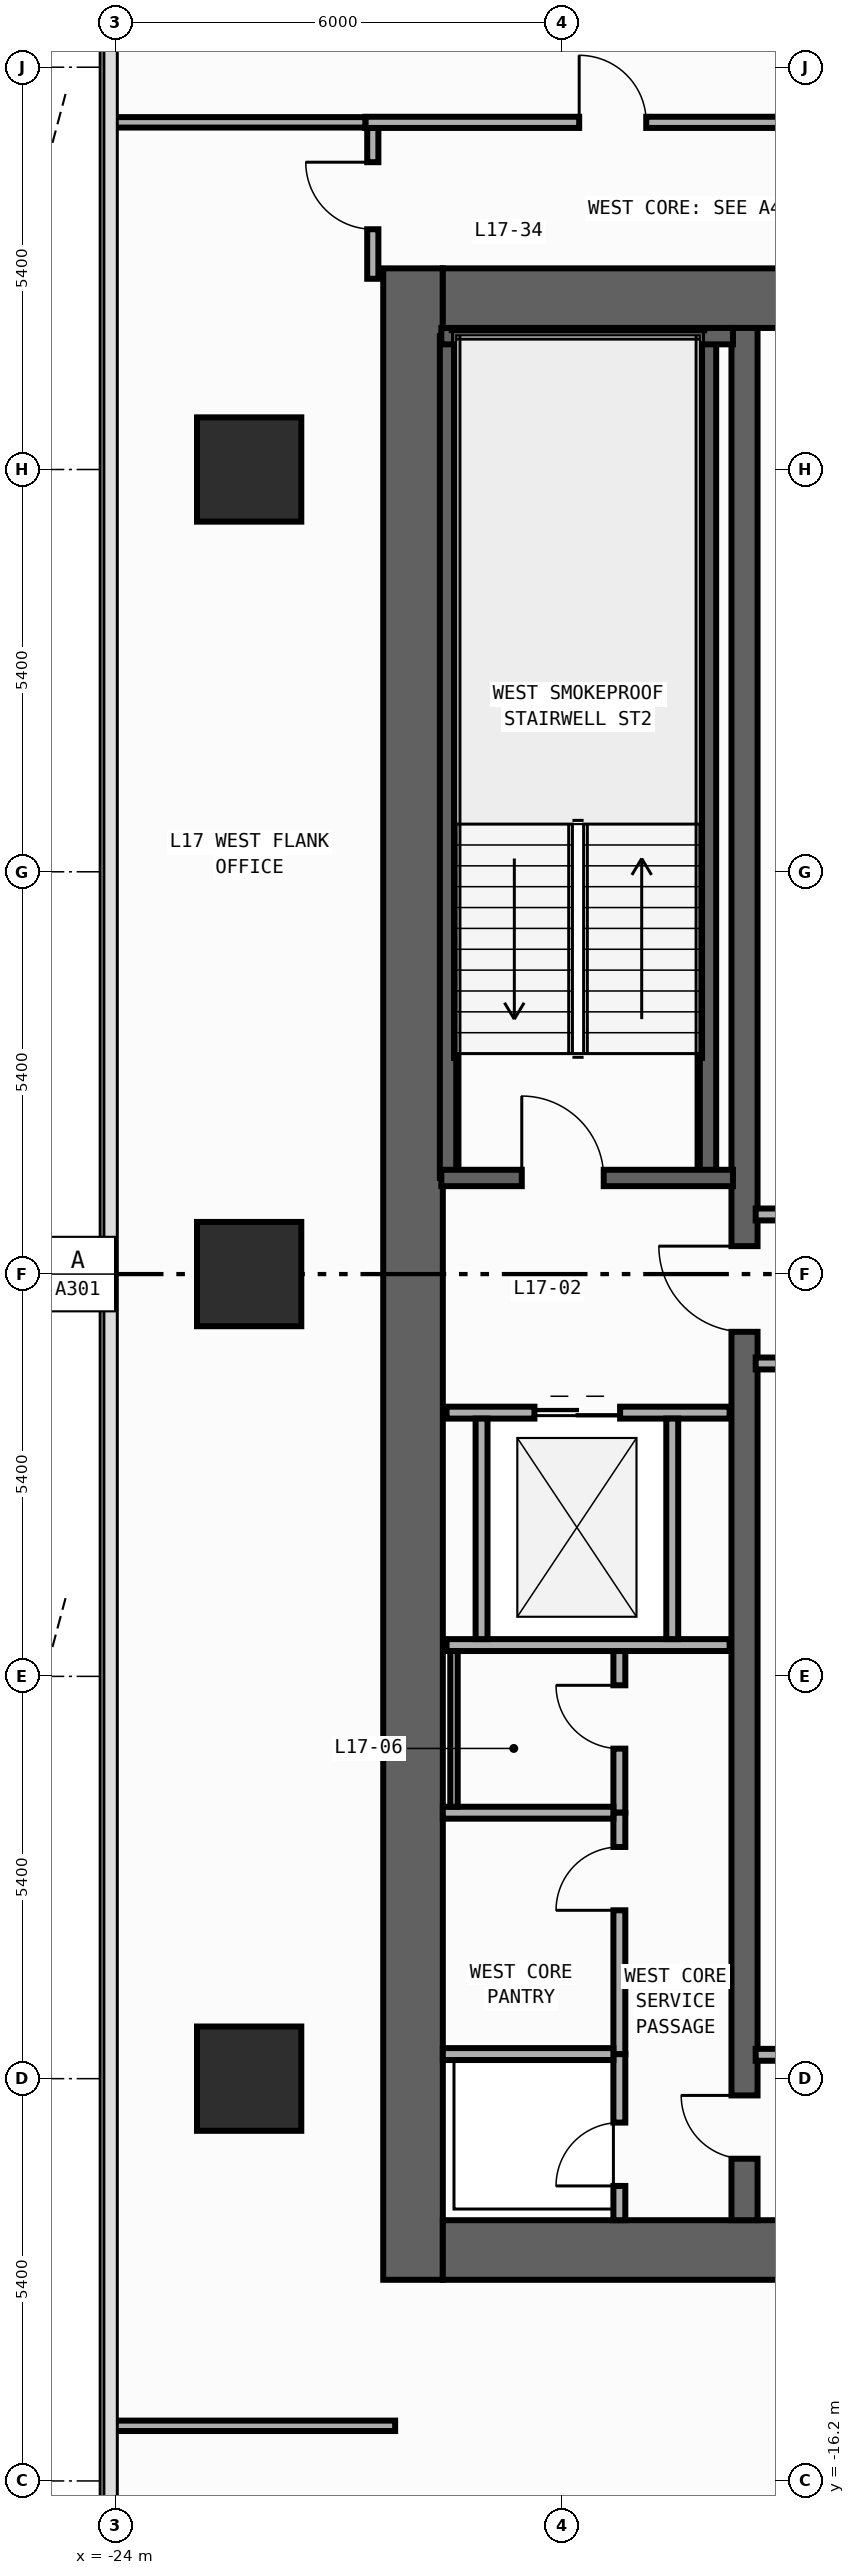
"""IFC4 building model, lengths in metres.
Left out: names, types, materials, properties, quantities, classifications, styles, units other than length and angle.
Written with IfcOpenShell. Run it as: python <this file> out.ifc"""

import sys

from ifc_helpers import new_model, si_unit, direction, frame, frame_2d, origin, origin_2d, place, context, subcontext, project, spatial, rectangle, extrude, element, fill, save


model = new_model("IFC4")
c1 = context("Model", 3, precision=1e-05, world=origin(), true_north=direction((0.0, 1.0)))
c2 = subcontext(c1, "Body", "Model", "MODEL_VIEW")
j1 = project(units=[si_unit("LENGTHUNIT", "METRE"), si_unit("PLANEANGLEUNIT", "RADIAN")], contexts=[c1])
p1 = place(None, origin())
s1 = spatial("IfcSite", under=j1, at=p1, CompositionType="ELEMENT")
p2 = place(p1, origin())
s2 = spatial("IfcBuilding", under=s1, at=p2, CompositionType="ELEMENT")
p3 = place(p2, frame((0.0, 0.0, 72.2)))
s3 = spatial("IfcBuildingStorey", under=s2, at=p3, CompositionType="ELEMENT", Elevation=72.2)
p4 = place(p3, frame((-20.0, -13.5, 0.0), z_axis=(0.0, 0.0, 1.0), x_axis=(0.0, 1.0, 0.0)))
e1 = element("IfcWall", 1, at=p4, inside=s3, PredefinedType="SHEAR", context=c2, shape_type="SweptSolid", body=[
    extrude(rectangle(XDim=27.0, YDim=0.8, at=frame_2d((13.5, 0.0))), origin(), (0.0, 0.0, 1.0), 3.94),
])
for number, where, z_axis, x_axis in (
    (2, (-19.6, -13.1, 0.0), (0.0, 0.0, 1.0), (1.0, 0.0, 0.0)),
    (3, (-19.6, 13.1, 0.0), (0.0, 0.0, 1.0), (1.0, 0.0, 0.0)),
):
    element("IfcWall", number, at=place(p3, frame(where, z_axis=z_axis, x_axis=x_axis)), inside=s3, PredefinedType="SHEAR", context=c2, shape_type="SweptSolid", body=[
        extrude(rectangle(XDim=6.8, YDim=0.8, at=frame_2d((3.4, 0.0))), origin(), (0.0, 0.0, 1.0), 3.94),
    ])
p5 = place(p3, frame((-15.55, -12.7, 0.0), z_axis=(0.0, 0.0, 1.0), x_axis=(0.0, 1.0, 0.0)))
e4 = element("IfcWall", 4, at=p5, inside=s3, PredefinedType="SHEAR", context=c2, shape_type="SweptSolid", body=[
    extrude(rectangle(XDim=25.4, YDim=0.35, at=frame_2d((12.7, 0.0))), origin(), (0.0, 0.0, 1.0), 3.94),
])
p6 = place(p5, frame((11.925, 0.0, 0.0)))
e5 = element("IfcOpeningElement", 5, at=p6, cuts=e4, PredefinedType="OPENING", context=c2, shape_type="SweptSolid", body=[
    extrude(rectangle(XDim=1.15, YDim=2.2, at=frame_2d((0.575, 1.1))), frame((0.0, 0.185, 0.0), z_axis=(0.0, -1.0, 0.0), x_axis=(1.0, 0.0, 0.0)), (0.0, 0.0, 1.0), 0.37),
])
p7 = place(p5, frame((0.825, 0.0, 0.0)))
e6 = element("IfcOpeningElement", 6, at=p7, cuts=e4, PredefinedType="OPENING", context=c2, shape_type="SweptSolid", body=[
    extrude(rectangle(XDim=0.85, YDim=2.1, at=frame_2d((0.425, 1.05))), frame((0.0, 0.185, 0.0), z_axis=(0.0, -1.0, 0.0), x_axis=(1.0, 0.0, 0.0)), (0.0, 0.0, 1.0), 0.37),
])
for number, where, z_axis, x_axis in (
    (7, (-16.04, 1.29, 0.0), (0.0, 0.0, 1.0), (0.0, 1.0, 0.0)),
    (8, (-19.53, 1.29, 0.0), (0.0, 0.0, 1.0), (0.0, 1.0, 0.0)),
):
    element("IfcWall", number, at=place(p3, frame(where, z_axis=z_axis, x_axis=x_axis)), inside=s3, PredefinedType="SHEAR", context=c2, shape_type="SweptSolid", body=[
        extrude(rectangle(XDim=11.3, YDim=0.22, at=frame_2d((5.65, 0.0))), origin(), (0.0, 0.0, 1.0), 3.94),
    ])
p8 = place(p3, frame((-19.62, 12.59, 0.0), z_axis=(0.0, 0.0, 1.0), x_axis=(1.0, 0.0, 0.0)))
e9 = element("IfcWall", 9, at=p8, inside=s3, PredefinedType="SHEAR", context=c2, shape_type="SweptSolid", body=[
    extrude(rectangle(XDim=3.915, YDim=0.22, at=frame_2d((1.958, 0.0))), origin(), (0.0, 0.0, 1.0), 3.94),
])
p9 = place(p3, frame((-19.62, 1.29, 0.0), z_axis=(0.0, 0.0, 1.0), x_axis=(1.0, 0.0, 0.0)))
e10 = element("IfcWall", 10, at=p9, inside=s3, PredefinedType="SHEAR", context=c2, shape_type="SweptSolid", body=[
    extrude(rectangle(XDim=3.915, YDim=0.22, at=frame_2d((1.958, 0.0))), origin(), (0.0, 0.0, 1.0), 3.94),
])
p10 = place(p9, frame((1.08, 0.0, 0.0)))
e11 = element("IfcOpeningElement", 11, at=p10, cuts=e10, PredefinedType="OPENING", context=c2, shape_type="SweptSolid", body=[
    extrude(rectangle(XDim=1.1, YDim=2.2, at=frame_2d((0.55, 1.1))), frame((0.0, 0.12, 0.0), z_axis=(0.0, -1.0, 0.0), x_axis=(1.0, 0.0, 0.0)), (0.0, 0.0, 1.0), 0.24),
])
for number, where, z_axis, x_axis in (
    (12, (-22.2, -10.8, 0.0), (0.0, 0.0, 1.0), (1.0, 0.0, 0.0)),
    (13, (-22.2, 0.0, 0.0), (0.0, 0.0, 1.0), (1.0, 0.0, 0.0)),
    (14, (-22.2, 10.8, 0.0), (0.0, 0.0, 1.0), (1.0, 0.0, 0.0)),
):
    element("IfcColumn", number, at=place(p3, frame(where, z_axis=z_axis, x_axis=x_axis)), inside=s3, PredefinedType="COLUMN", context=c2, shape_type="SweptSolid", body=[
        extrude(rectangle(XDim=1.4, YDim=1.4, at=origin_2d()), origin(), (0.0, 0.0, 1.0), 4.2),
    ])
p11 = place(p3, frame((-19.55, -1.86, 0.0), z_axis=(0.0, 0.0, 1.0), x_axis=(1.0, 0.0, 0.0)))
e15 = element("IfcWall", 15, at=p11, inside=s3, PredefinedType="STANDARD", context=c2, shape_type="SweptSolid", body=[
    extrude(rectangle(XDim=3.8, YDim=0.16, at=frame_2d((1.9, 0.0))), origin(), (0.0, 0.0, 1.0), 3.94),
])
p12 = place(p11, frame((1.18, 0.0, 0.0)))
e16 = element("IfcOpeningElement", 16, at=p12, cuts=e15, PredefinedType="OPENING", context=c2, shape_type="SweptSolid", body=[
    extrude(rectangle(XDim=1.15, YDim=2.2, at=frame_2d((0.575, 1.1))), frame((0.0, 0.09, 0.0), z_axis=(0.0, -1.0, 0.0), x_axis=(1.0, 0.0, 0.0)), (0.0, 0.0, 1.0), 0.18),
])
p13 = place(p3, frame((-19.55, -4.98, 0.0), z_axis=(0.0, 0.0, 1.0), x_axis=(1.0, 0.0, 0.0)))
e17 = element("IfcWall", 17, at=p13, inside=s3, PredefinedType="STANDARD", context=c2, shape_type="SweptSolid", body=[
    extrude(rectangle(XDim=3.8, YDim=0.16, at=frame_2d((1.9, 0.0))), origin(), (0.0, 0.0, 1.0), 3.94),
])
for number, where, z_axis, x_axis in (
    (18, (-19.08, -4.9, 0.0), (0.0, 0.0, 1.0), (0.0, 1.0, 0.0)),
    (19, (-16.52, -4.9, 0.0), (0.0, 0.0, 1.0), (0.0, 1.0, 0.0)),
):
    element("IfcWall", number, at=place(p3, frame(where, z_axis=z_axis, x_axis=x_axis)), inside=s3, PredefinedType="STANDARD", context=c2, shape_type="SweptSolid", body=[
        extrude(rectangle(XDim=2.96, YDim=0.16, at=frame_2d((1.48, 0.0))), origin(), (0.0, 0.0, 1.0), 3.94),
    ])
for number, where, z_axis, x_axis in (
    (20, (-15.4, 0.8, 0.0), (0.0, 0.0, 1.0), (1.0, 0.0, 0.0)),
    (21, (-15.4, -1.2, 0.0), (0.0, 0.0, 1.0), (1.0, 0.0, 0.0)),
    (22, (-15.4, -10.48, 0.0), (0.0, 0.0, 1.0), (1.0, 0.0, 0.0)),
):
    element("IfcWall", number, at=place(p3, frame(where, z_axis=z_axis, x_axis=x_axis)), inside=s3, PredefinedType="STANDARD", context=c2, shape_type="SweptSolid", body=[
        extrude(rectangle(XDim=2.6, YDim=0.16, at=frame_2d((1.3, 0.0))), origin(), (0.0, 0.0, 1.0), 3.94),
    ])
p14 = place(p3, frame((-17.23, -12.7, 0.0), z_axis=(0.0, 0.0, 1.0), x_axis=(0.0, 1.0, 0.0)))
e23 = element("IfcWall", 23, at=p14, inside=s3, PredefinedType="PARTITIONING", context=c2, shape_type="SweptSolid", body=[
    extrude(rectangle(XDim=2.23, YDim=0.16, at=frame_2d((1.115, 0.0))), origin(), (0.0, 0.0, 1.0), 3.94),
])
p15 = place(p14, frame((0.46, 0.0, 0.0)))
e24 = element("IfcOpeningElement", 24, at=p15, cuts=e23, PredefinedType="OPENING", context=c2, shape_type="SweptSolid", body=[
    extrude(rectangle(XDim=0.85, YDim=2.1, at=frame_2d((0.425, 1.05))), frame((0.0, 0.09, 0.0), z_axis=(0.0, -1.0, 0.0), x_axis=(1.0, 0.0, 0.0)), (0.0, 0.0, 1.0), 0.18),
])
p16 = place(p3, frame((-17.23, -7.23, 0.0), z_axis=(0.0, 0.0, 1.0), x_axis=(0.0, 1.0, 0.0)))
e25 = element("IfcWall", 25, at=p16, inside=s3, PredefinedType="PARTITIONING", context=c2, shape_type="SweptSolid", body=[
    extrude(rectangle(XDim=2.17, YDim=0.16, at=frame_2d((1.085, 0.0))), origin(), (0.0, 0.0, 1.0), 3.94),
])
p17 = place(p16, frame((0.86, 0.0, 0.0)))
e26 = element("IfcOpeningElement", 26, at=p17, cuts=e25, PredefinedType="OPENING", context=c2, shape_type="SweptSolid", body=[
    extrude(rectangle(XDim=0.85, YDim=2.1, at=frame_2d((0.425, 1.05))), frame((0.0, 0.09, 0.0), z_axis=(0.0, -1.0, 0.0), x_axis=(1.0, 0.0, 0.0)), (0.0, 0.0, 1.0), 0.18),
])
p18 = place(p3, frame((-17.23, -10.47, 0.0), z_axis=(0.0, 0.0, 1.0), x_axis=(0.0, 1.0, 0.0)))
e27 = element("IfcWall", 27, at=p18, inside=s3, PredefinedType="PARTITIONING", context=c2, shape_type="SweptSolid", body=[
    extrude(rectangle(XDim=3.24, YDim=0.16, at=frame_2d((1.62, 0.0))), origin(), (0.0, 0.0, 1.0), 3.94),
])
p19 = place(p18, frame((1.93, 0.0, 0.0)))
e28 = element("IfcOpeningElement", 28, at=p19, cuts=e27, PredefinedType="OPENING", context=c2, shape_type="SweptSolid", body=[
    extrude(rectangle(XDim=0.85, YDim=2.1, at=frame_2d((0.425, 1.05))), frame((0.0, 0.09, 0.0), z_axis=(0.0, -1.0, 0.0), x_axis=(1.0, 0.0, 0.0)), (0.0, 0.0, 1.0), 0.18),
])
for number, where, z_axis, x_axis in (
    (29, (-19.6, -10.47, 0.0), (0.0, 0.0, 1.0), (1.0, 0.0, 0.0)),
    (30, (-19.6, -7.23, 0.0), (0.0, 0.0, 1.0), (1.0, 0.0, 0.0)),
):
    element("IfcWall", number, at=place(p3, frame(where, z_axis=z_axis, x_axis=x_axis)), inside=s3, PredefinedType="PARTITIONING", context=c2, shape_type="SweptSolid", body=[
        extrude(rectangle(XDim=2.29, YDim=0.16, at=frame_2d((1.145, 0.0))), origin(), (0.0, 0.0, 1.0), 3.94),
    ])
p20 = place(p3, frame((-20.54, 13.36, 0.0), z_axis=(0.0, 0.0, 1.0), x_axis=(0.0, 1.0, 0.0)))
e31 = element("IfcWall", 31, at=p20, inside=s3, PredefinedType="PARTITIONING", context=c2, shape_type="SweptSolid", body=[
    extrude(rectangle(XDim=2.025, YDim=0.15, at=frame_2d((1.012, 0.0))), origin(), (0.0, 0.0, 1.0), 3.94),
])
p21 = place(p20, frame((0.665, 0.0, 0.0)))
e32 = element("IfcOpeningElement", 32, at=p21, cuts=e31, PredefinedType="OPENING", context=c2, shape_type="SweptSolid", body=[
    extrude(rectangle(XDim=0.9, YDim=2.15, at=frame_2d((0.45, 1.075))), frame((0.0, 0.085, 0.0), z_axis=(0.0, -1.0, 0.0), x_axis=(1.0, 0.0, 0.0)), (0.0, 0.0, 1.0), 0.17),
])
p22 = place(p3, frame((-20.64, 15.46, 0.0), z_axis=(0.0, 0.0, 1.0), x_axis=(1.0, 0.0, 0.0)))
e33 = element("IfcWall", 33, at=p22, inside=s3, PredefinedType="PARTITIONING", context=c2, shape_type="SweptSolid", body=[
    extrude(rectangle(XDim=8.65, YDim=0.15, at=frame_2d((4.325, 0.0))), origin(), (0.0, 0.0, 1.0), 3.94),
])
p23 = place(p22, frame((2.871, 0.0, 0.0)))
e34 = element("IfcOpeningElement", 34, at=p23, cuts=e33, PredefinedType="OPENING", context=c2, shape_type="SweptSolid", body=[
    extrude(rectangle(XDim=0.9, YDim=2.15, at=frame_2d((0.45, 1.075))), frame((0.0, 0.085, 0.0), z_axis=(0.0, -1.0, 0.0), x_axis=(1.0, 0.0, 0.0)), (0.0, 0.0, 1.0), 0.17),
])
p24 = place(p3, frame((-24.055, 15.46, 0.0), z_axis=(0.0, 0.0, 1.0), x_axis=(1.0, 0.0, 0.0)))
e35 = element("IfcWall", 35, at=p24, inside=s3, PredefinedType="PARTITIONING", context=c2, shape_type="SweptSolid", body=[
    extrude(rectangle(XDim=3.415, YDim=0.14, at=frame_2d((1.708, 0.0))), origin(), (0.0, 0.0, 1.0), 3.94),
])
p25 = place(p3, frame((-24.055, -15.46, 0.0), z_axis=(0.0, 0.0, 1.0), x_axis=(1.0, 0.0, 0.0)))
e36 = element("IfcWall", 36, at=p25, inside=s3, PredefinedType="PARTITIONING", context=c2, shape_type="SweptSolid", body=[
    extrude(rectangle(XDim=3.815, YDim=0.14, at=frame_2d((1.907, 0.0))), origin(), (0.0, 0.0, 1.0), 3.94),
])
p26 = place(p3, frame((-19.45, -7.15, 0.0), z_axis=(0.0, 0.0, 1.0), x_axis=(0.0, 1.0, 0.0)))
e37 = element("IfcWall", 37, at=p26, inside=s3, PredefinedType="PARTITIONING", context=c2, shape_type="SweptSolid", body=[
    extrude(rectangle(XDim=2.09, YDim=0.1, at=frame_2d((1.045, 0.0))), origin(), (0.0, 0.0, 1.0), 3.94),
])
p27 = place(p10, origin())
e38 = element("IfcDoor", 38, at=p27, inside=s3, OperationType="SINGLE_SWING_LEFT", PredefinedType="DOOR", context=c2, shape_type="SweptSolid", body=[
    extrude(rectangle(XDim=1.1, YDim=2.2, at=frame_2d((0.55, 1.1))), frame((0.0, 0.025, 0.0), z_axis=(0.0, -1.0, 0.0), x_axis=(1.0, 0.0, 0.0)), (0.0, 0.0, 1.0), 0.05),
])
fill(e11, e38)
p28 = place(p6, origin())
e39 = element("IfcDoor", 39, at=p28, inside=s3, OperationType="SINGLE_SWING_RIGHT", PredefinedType="DOOR", context=c2, shape_type="SweptSolid", body=[
    extrude(rectangle(XDim=1.15, YDim=2.2, at=frame_2d((0.575, 1.1))), frame((0.0, 0.025, 0.0), z_axis=(0.0, -1.0, 0.0), x_axis=(1.0, 0.0, 0.0)), (0.0, 0.0, 1.0), 0.05),
])
fill(e5, e39)
p29 = place(p7, origin())
e40 = element("IfcDoor", 40, at=p29, inside=s3, OperationType="SINGLE_SWING_RIGHT", PredefinedType="DOOR", context=c2, shape_type="SweptSolid", body=[
    extrude(rectangle(XDim=0.85, YDim=2.1, at=frame_2d((0.425, 1.05))), frame((0.0, 0.025, 0.0), z_axis=(0.0, -1.0, 0.0), x_axis=(1.0, 0.0, 0.0)), (0.0, 0.0, 1.0), 0.05),
])
fill(e6, e40)
p30 = place(p12, origin())
e41 = element("IfcDoor", 41, at=p30, inside=s3, OperationType="DOUBLE_DOOR_SLIDING", PredefinedType="DOOR", context=c2, shape_type="SweptSolid", body=[
    extrude(rectangle(XDim=1.15, YDim=2.2, at=frame_2d((0.575, 1.1))), frame((0.0, 0.025, 0.0), z_axis=(0.0, -1.0, 0.0), x_axis=(1.0, 0.0, 0.0)), (0.0, 0.0, 1.0), 0.05),
])
fill(e16, e41)
p31 = place(p15, origin())
e42 = element("IfcDoor", 42, at=p31, inside=s3, OperationType="SINGLE_SWING_LEFT", PredefinedType="DOOR", context=c2, shape_type="SweptSolid", body=[
    extrude(rectangle(XDim=0.85, YDim=2.1, at=frame_2d((0.425, 1.05))), frame((0.0, 0.025, 0.0), z_axis=(0.0, -1.0, 0.0), x_axis=(1.0, 0.0, 0.0)), (0.0, 0.0, 1.0), 0.05),
])
fill(e24, e42)
p32 = place(p17, origin())
e43 = element("IfcDoor", 43, at=p32, inside=s3, OperationType="SINGLE_SWING_RIGHT", PredefinedType="DOOR", context=c2, shape_type="SweptSolid", body=[
    extrude(rectangle(XDim=0.85, YDim=2.1, at=frame_2d((0.425, 1.05))), frame((0.0, 0.025, 0.0), z_axis=(0.0, -1.0, 0.0), x_axis=(1.0, 0.0, 0.0)), (0.0, 0.0, 1.0), 0.05),
])
fill(e26, e43)
p33 = place(p19, origin())
e44 = element("IfcDoor", 44, at=p33, inside=s3, OperationType="SINGLE_SWING_LEFT", PredefinedType="DOOR", context=c2, shape_type="SweptSolid", body=[
    extrude(rectangle(XDim=0.85, YDim=2.1, at=frame_2d((0.425, 1.05))), frame((0.0, 0.025, 0.0), z_axis=(0.0, -1.0, 0.0), x_axis=(1.0, 0.0, 0.0)), (0.0, 0.0, 1.0), 0.05),
])
fill(e28, e44)
p34 = place(p21, origin())
e45 = element("IfcDoor", 45, at=p34, inside=s3, OperationType="SINGLE_SWING_RIGHT", PredefinedType="DOOR", context=c2, shape_type="SweptSolid", body=[
    extrude(rectangle(XDim=0.9, YDim=2.15, at=frame_2d((0.45, 1.075))), frame((0.0, 0.025, 0.0), z_axis=(0.0, -1.0, 0.0), x_axis=(1.0, 0.0, 0.0)), (0.0, 0.0, 1.0), 0.05),
])
fill(e32, e45)
p35 = place(p23, origin())
e46 = element("IfcDoor", 46, at=p35, inside=s3, OperationType="SINGLE_SWING_LEFT", PredefinedType="DOOR", context=c2, shape_type="SweptSolid", body=[
    extrude(rectangle(XDim=0.9, YDim=2.15, at=frame_2d((0.45, 1.075))), frame((0.0, 0.025, 0.0), z_axis=(0.0, -1.0, 0.0), x_axis=(1.0, 0.0, 0.0)), (0.0, 0.0, 1.0), 0.05),
])
fill(e34, e46)
save(model, sys.argv[1])
